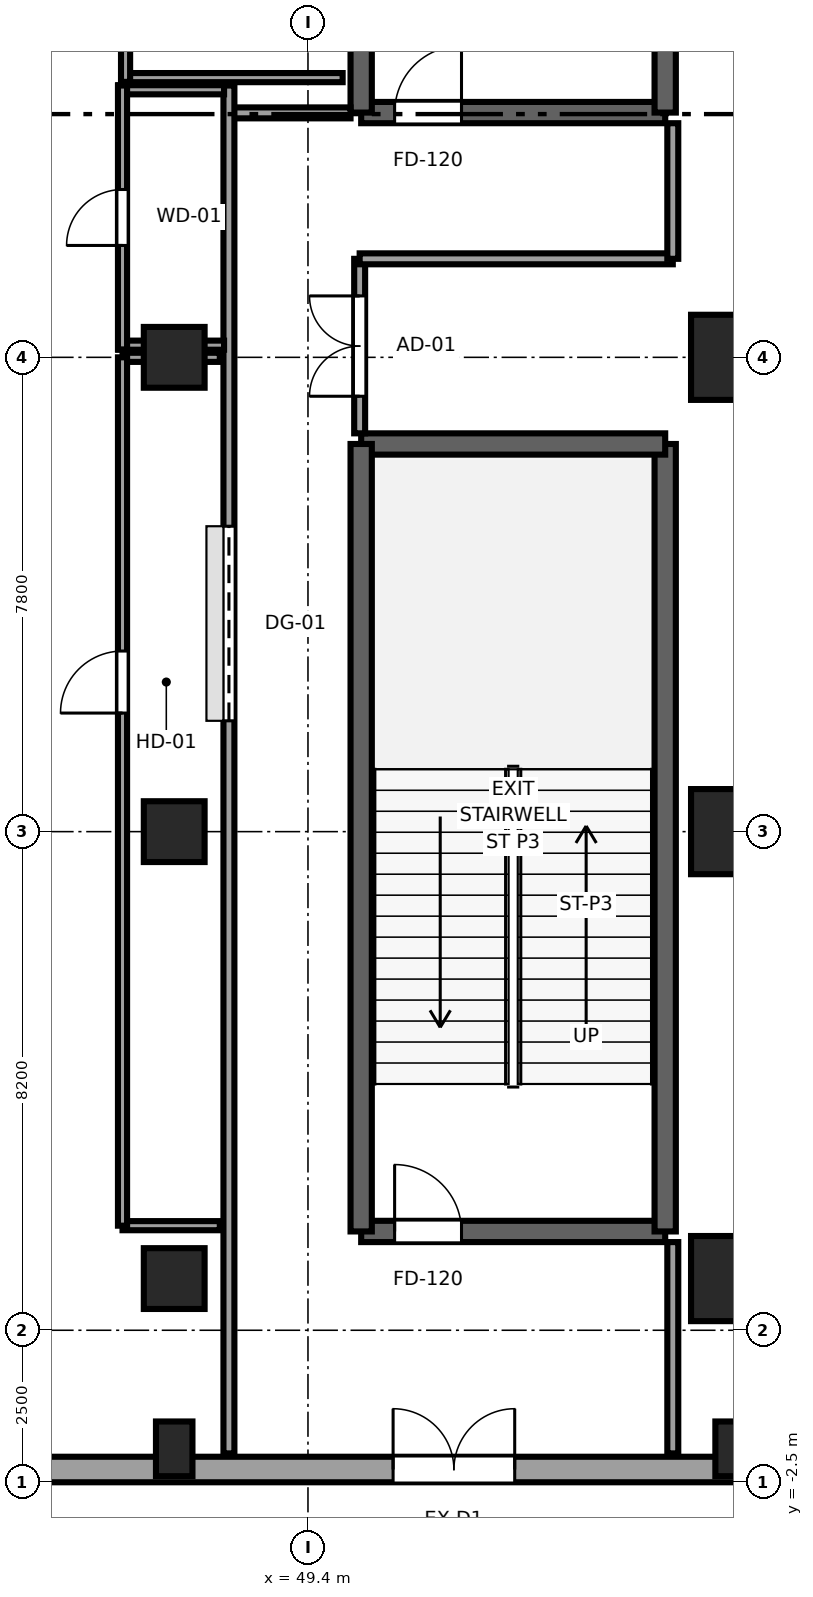
"""IFC4 building model, lengths in metres.
Left out: names, types, materials, properties, quantities, classifications, styles, units other than length and angle.
Written with IfcOpenShell. Run it as: python <this file> out.ifc"""

import sys

from ifc_helpers import new_model, si_unit, direction, frame, frame_2d, origin, origin_2d, place, context, subcontext, project, spatial, rectangle, extrude, source, transform, mapped, element, fill, save


model = new_model("IFC4")
c1 = context("Model", 3, precision=1e-05, world=origin(), true_north=direction((0.0, 1.0)))
c2 = subcontext(c1, "Body", "Model", "MODEL_VIEW")
j1 = project(units=[si_unit("LENGTHUNIT", "METRE"), si_unit("PLANEANGLEUNIT", "RADIAN")], contexts=[c1])
p1 = place(None, origin())
s1 = spatial("IfcSite", under=j1, at=p1, CompositionType="ELEMENT")
p2 = place(p1, origin())
s2 = spatial("IfcBuilding", under=s1, at=p2, CompositionType="ELEMENT")
p3 = place(p2, origin())
s3 = spatial("IfcBuildingStorey", under=s2, at=p3, CompositionType="ELEMENT", Elevation=0.0)
p4 = place(p3, frame((50.275, 1.625, 0.0), z_axis=(0.0, 0.0, 1.0), x_axis=(1.0, 0.0, 0.0)))
e1 = element("IfcWall", 1, at=p4, inside=s3, PredefinedType="SHEAR", context=c2, shape_type="SweptSolid", body=[
    extrude(rectangle(XDim=5.0, YDim=0.35, at=frame_2d((2.5, 0.0))), origin(), (0.0, 0.0, 1.0), 6.0),
])
p5 = place(p4, frame((1.65, 0.0, 0.0), z_axis=(0.0, 0.0, 1.0), x_axis=(-1.0, 0.0, 0.0)))
e2 = element("IfcOpeningElement", 2, at=p5, cuts=e1, PredefinedType="OPENING", context=c2, shape_type="SweptSolid", body=[
    extrude(rectangle(XDim=1.1, YDim=2.12, at=frame_2d((0.55, 1.06))), frame((0.0, 0.185, 0.0), z_axis=(0.0, -1.0, 0.0), x_axis=(1.0, 0.0, 0.0)), (0.0, 0.0, 1.0), 0.37),
])
p6 = place(p3, frame((55.275, 1.625, 0.0), z_axis=(0.0, 0.0, 1.0), x_axis=(0.0, 1.0, 0.0)))
e3 = element("IfcWall", 3, at=p6, inside=s3, PredefinedType="SHEAR", context=c2, shape_type="SweptSolid", body=[
    extrude(rectangle(XDim=12.95, YDim=0.35, at=frame_2d((6.475, 0.0))), origin(), (0.0, 0.0, 1.0), 6.0),
])
p7 = place(p3, frame((55.275, 14.575, 0.0), z_axis=(0.0, 0.0, 1.0), x_axis=(-1.0, 0.0, 0.0)))
e4 = element("IfcWall", 4, at=p7, inside=s3, PredefinedType="SHEAR", context=c2, shape_type="SweptSolid", body=[
    extrude(rectangle(XDim=5.0, YDim=0.35, at=frame_2d((2.5, 0.0))), origin(), (0.0, 0.0, 1.0), 6.0),
])
p8 = place(p3, frame((50.275, 14.575, 0.0), z_axis=(0.0, 0.0, 1.0), x_axis=(0.0, -1.0, 0.0)))
e5 = element("IfcWall", 5, at=p8, inside=s3, PredefinedType="SHEAR", context=c2, shape_type="SweptSolid", body=[
    extrude(rectangle(XDim=12.95, YDim=0.35, at=frame_2d((6.475, 0.0))), origin(), (0.0, 0.0, 1.0), 6.0),
])
p9 = place(p3, frame((50.275, 20.025, 0.0), z_axis=(0.0, 0.0, 1.0), x_axis=(1.0, 0.0, 0.0)))
e6 = element("IfcWall", 6, at=p9, inside=s3, PredefinedType="SHEAR", context=c2, shape_type="SweptSolid", body=[
    extrude(rectangle(XDim=5.0, YDim=0.35, at=frame_2d((2.5, 0.0))), origin(), (0.0, 0.0, 1.0), 6.0),
])
p10 = place(p9, frame((1.65, 0.0, 0.0), z_axis=(0.0, 0.0, 1.0), x_axis=(-1.0, 0.0, 0.0)))
e7 = element("IfcOpeningElement", 7, at=p10, cuts=e6, PredefinedType="OPENING", context=c2, shape_type="SweptSolid", body=[
    extrude(rectangle(XDim=1.1, YDim=2.12, at=frame_2d((0.55, 1.06))), frame((0.0, 0.185, 0.0), z_axis=(0.0, -1.0, 0.0), x_axis=(1.0, 0.0, 0.0)), (0.0, 0.0, 1.0), 0.37),
])
for number, where, z_axis, x_axis in (
    (8, (55.275, 20.025, 0.0), (0.0, 0.0, 1.0), (0.0, 1.0, 0.0)),
    (9, (50.275, 32.975, 0.0), (0.0, 0.0, 1.0), (0.0, -1.0, 0.0)),
):
    element("IfcWall", number, at=place(p3, frame(where, z_axis=z_axis, x_axis=x_axis)), inside=s3, PredefinedType="SHEAR", context=c2, shape_type="SweptSolid", body=[
        extrude(rectangle(XDim=12.95, YDim=0.35, at=frame_2d((6.475, 0.0))), origin(), (0.0, 0.0, 1.0), 6.0),
    ])
m1 = source(origin(), c2, "Body", "SweptSolid", [
    extrude(rectangle(XDim=1.0, YDim=1.0, at=origin_2d()), origin(), (0.0, 0.0, 1.0), 6.0),
])
p11 = place(p3, frame((47.2, 0.85, 0.0), z_axis=(0.0, 0.0, 1.0), x_axis=(1.0, 0.0, 0.0)))
e10 = element("IfcColumn", 10, at=p11, inside=s3, PredefinedType="COLUMN", context=c2, shape_type="MappedRepresentation", body=[
    mapped(m1, transform((0.0, 0.0, 0.0), x_axis=(1.0, 0.0, 0.0), y_axis=(0.0, 1.0, 0.0), z_axis=(0.0, 0.0, 1.0), scale=1.0)),
])
m2 = source(origin(), c2, "Body", "SweptSolid", [
    extrude(rectangle(XDim=1.4, YDim=1.4, at=origin_2d()), origin(), (0.0, 0.0, 1.0), 6.0),
])
p12 = place(p3, frame((56.4, 0.85, 0.0), z_axis=(0.0, 0.0, 1.0), x_axis=(1.0, 0.0, 0.0)))
e11 = element("IfcColumn", 11, at=p12, inside=s3, PredefinedType="COLUMN", context=c2, shape_type="MappedRepresentation", body=[
    mapped(m2, transform((0.0, 0.0, 0.0), x_axis=(1.0, 0.0, 0.0), y_axis=(0.0, 1.0, 0.0), z_axis=(0.0, 0.0, 1.0), scale=1.0)),
])
p13 = place(p3, frame((47.2, 8.2, 0.0), z_axis=(0.0, 0.0, 1.0), x_axis=(1.0, 0.0, 0.0)))
e12 = element("IfcColumn", 12, at=p13, inside=s3, PredefinedType="COLUMN", context=c2, shape_type="MappedRepresentation", body=[
    mapped(m1, transform((0.0, 0.0, 0.0), x_axis=(1.0, 0.0, 0.0), y_axis=(0.0, 1.0, 0.0), z_axis=(0.0, 0.0, 1.0), scale=1.0)),
])
p14 = place(p3, frame((56.4, 8.2, 0.0), z_axis=(0.0, 0.0, 1.0), x_axis=(1.0, 0.0, 0.0)))
e13 = element("IfcColumn", 13, at=p14, inside=s3, PredefinedType="COLUMN", context=c2, shape_type="MappedRepresentation", body=[
    mapped(m2, transform((0.0, 0.0, 0.0), x_axis=(1.0, 0.0, 0.0), y_axis=(0.0, 1.0, 0.0), z_axis=(0.0, 0.0, 1.0), scale=1.0)),
])
p15 = place(p3, frame((47.2, 16.0, 0.0), z_axis=(0.0, 0.0, 1.0), x_axis=(1.0, 0.0, 0.0)))
e14 = element("IfcColumn", 14, at=p15, inside=s3, PredefinedType="COLUMN", context=c2, shape_type="MappedRepresentation", body=[
    mapped(m1, transform((0.0, 0.0, 0.0), x_axis=(1.0, 0.0, 0.0), y_axis=(0.0, 1.0, 0.0), z_axis=(0.0, 0.0, 1.0), scale=1.0)),
])
p16 = place(p3, frame((56.4, 16.0, 0.0), z_axis=(0.0, 0.0, 1.0), x_axis=(1.0, 0.0, 0.0)))
e15 = element("IfcColumn", 15, at=p16, inside=s3, PredefinedType="COLUMN", context=c2, shape_type="MappedRepresentation", body=[
    mapped(m2, transform((0.0, 0.0, 0.0), x_axis=(1.0, 0.0, 0.0), y_axis=(0.0, 1.0, 0.0), z_axis=(0.0, 0.0, 1.0), scale=1.0)),
])
m3 = source(origin(), c2, "Body", "SweptSolid", [
    extrude(rectangle(XDim=0.6, YDim=0.9, at=origin_2d()), origin(), (0.0, 0.0, 1.0), 6.0),
])
for number, where, z_axis, x_axis in (
    (16, (47.2, -1.95, 0.0), (0.0, 0.0, 1.0), (1.0, 0.0, 0.0)),
    (17, (56.4, -1.95, 0.0), (0.0, 0.0, 1.0), (1.0, 0.0, 0.0)),
):
    element("IfcColumn", number, at=place(p3, frame(where, z_axis=z_axis, x_axis=x_axis)), inside=s3, PredefinedType="PILASTER", context=c2, shape_type="MappedRepresentation", body=[
        mapped(m3, transform((0.0, 0.0, 0.0), x_axis=(1.0, 0.0, 0.0), y_axis=(0.0, 1.0, 0.0), z_axis=(0.0, 0.0, 1.0), scale=1.0)),
    ])
p17 = place(p3, frame((37.59, -2.29, 0.0), z_axis=(0.0, 0.0, 1.0), x_axis=(1.0, 0.0, 0.0)))
e18 = element("IfcWall", 18, at=p17, inside=s3, PredefinedType="SOLIDWALL", context=c2, shape_type="SweptSolid", body=[
    extrude(rectangle(XDim=27.6, YDim=0.42, at=frame_2d((13.8, 0.0))), origin(), (0.0, 0.0, 1.0), 5.74),
])
p18 = place(p17, frame((6.11, 0.0, 0.0), z_axis=(0.0, 0.0, 1.0), x_axis=(-1.0, 0.0, 0.0)))
e19 = element("IfcOpeningElement", 19, at=p18, cuts=e18, PredefinedType="OPENING", context=c2, shape_type="SweptSolid", body=[
    extrude(rectangle(XDim=2.0, YDim=2.25, at=frame_2d((1.0, 1.125))), frame((0.0, 0.22, 0.0), z_axis=(0.0, -1.0, 0.0), x_axis=(1.0, 0.0, 0.0)), (0.0, 0.0, 1.0), 0.44),
])
p19 = place(p17, frame((15.21, 0.0, 0.0), z_axis=(0.0, 0.0, 1.0), x_axis=(-1.0, 0.0, 0.0)))
e20 = element("IfcOpeningElement", 20, at=p19, cuts=e18, PredefinedType="OPENING", context=c2, shape_type="SweptSolid", body=[
    extrude(rectangle(XDim=2.0, YDim=2.25, at=frame_2d((1.0, 1.125))), frame((0.0, 0.22, 0.0), z_axis=(0.0, -1.0, 0.0), x_axis=(1.0, 0.0, 0.0)), (0.0, 0.0, 1.0), 0.44),
])
p20 = place(p17, frame((24.01, 0.0, 0.0), z_axis=(0.0, 0.0, 1.0), x_axis=(-1.0, 0.0, 0.0)))
e21 = element("IfcOpeningElement", 21, at=p20, cuts=e18, PredefinedType="OPENING", context=c2, shape_type="SweptSolid", body=[
    extrude(rectangle(XDim=2.0, YDim=2.25, at=frame_2d((1.0, 1.125))), frame((0.0, 0.22, 0.0), z_axis=(0.0, -1.0, 0.0), x_axis=(1.0, 0.0, 0.0)), (0.0, 0.0, 1.0), 0.44),
])
p21 = place(p3, frame((55.4, -2.025, 0.0), z_axis=(0.0, 0.0, 1.0), x_axis=(0.0, 1.0, 0.0)))
e22 = element("IfcWall", 22, at=p21, inside=s3, PredefinedType="PARTITIONING", context=c2, shape_type="SweptSolid", body=[
    extrude(rectangle(XDim=3.475, YDim=0.18, at=frame_2d((1.737, 0.0))), origin(), (0.0, 0.0, 1.0), 5.74),
])
p22 = place(p3, frame((50.25, 14.75, 0.0), z_axis=(0.0, 0.0, 1.0), x_axis=(0.0, 1.0, 0.0)))
e23 = element("IfcWall", 23, at=p22, inside=s3, PredefinedType="PARTITIONING", context=c2, shape_type="SweptSolid", body=[
    extrude(rectangle(XDim=2.87, YDim=0.18, at=frame_2d((1.435, 0.0))), origin(), (0.0, 0.0, 1.0), 5.74),
])
p23 = place(p22, frame((0.61, 0.0, 0.0)))
e24 = element("IfcOpeningElement", 24, at=p23, cuts=e23, PredefinedType="OPENING", context=c2, shape_type="SweptSolid", body=[
    extrude(rectangle(XDim=1.65, YDim=2.15, at=frame_2d((0.825, 1.075))), frame((0.0, 0.1, 0.0), z_axis=(0.0, -1.0, 0.0), x_axis=(1.0, 0.0, 0.0)), (0.0, 0.0, 1.0), 0.2),
])
p24 = place(p3, frame((50.25, 17.62, 0.0), z_axis=(0.0, 0.0, 1.0), x_axis=(1.0, 0.0, 0.0)))
e25 = element("IfcWall", 25, at=p24, inside=s3, PredefinedType="PARTITIONING", context=c2, shape_type="SweptSolid", body=[
    extrude(rectangle(XDim=5.15, YDim=0.18, at=frame_2d((2.575, 0.0))), origin(), (0.0, 0.0, 1.0), 5.74),
])
p25 = place(p3, frame((55.4, 17.62, 0.0), z_axis=(0.0, 0.0, 1.0), x_axis=(0.0, 1.0, 0.0)))
e26 = element("IfcWall", 26, at=p25, inside=s3, PredefinedType="PARTITIONING", context=c2, shape_type="SweptSolid", body=[
    extrude(rectangle(XDim=2.23, YDim=0.18, at=frame_2d((1.115, 0.0))), origin(), (0.0, 0.0, 1.0), 5.74),
])
p26 = place(p3, frame((48.1, 20.02, 0.0), z_axis=(0.0, 0.0, 1.0), x_axis=(1.0, 0.0, 0.0)))
e27 = element("IfcWall", 27, at=p26, inside=s3, PredefinedType="PARTITIONING", context=c2, shape_type="SweptSolid", body=[
    extrude(rectangle(XDim=2.0, YDim=0.18, at=frame_2d((1.0, 0.0))), origin(), (0.0, 0.0, 1.0), 5.74),
])
p27 = place(p3, frame((48.1, -2.025, 0.0), z_axis=(0.0, 0.0, 1.0), x_axis=(0.0, 1.0, 0.0)))
e28 = element("IfcWall", 28, at=p27, inside=s3, PredefinedType="PARTITIONING", context=c2, shape_type="SweptSolid", body=[
    extrude(rectangle(XDim=22.495, YDim=0.18, at=frame_2d((11.248, 0.0))), origin(), (0.0, 0.0, 1.0), 5.74),
])
p28 = place(p27, frame((12.048, 0.0, 0.0)))
e29 = element("IfcOpeningElement", 29, at=p28, cuts=e28, PredefinedType="OPENING", context=c2, shape_type="SweptSolid", body=[
    extrude(rectangle(XDim=3.2, YDim=2.8, at=frame_2d((1.6, 1.4))), frame((0.0, 0.1, 0.0), z_axis=(0.0, -1.0, 0.0), x_axis=(1.0, 0.0, 0.0)), (0.0, 0.0, 1.0), 0.2),
])
p29 = place(p3, frame((46.28, 16.2, 0.0), z_axis=(0.0, 0.0, 1.0), x_axis=(1.0, 0.0, 0.0)))
e30 = element("IfcWall", 30, at=p29, inside=s3, PredefinedType="PARTITIONING", context=c2, shape_type="SweptSolid", body=[
    extrude(rectangle(XDim=1.74, YDim=0.15, at=frame_2d((0.87, 0.0))), origin(), (0.0, 0.0, 1.0), 4.914),
])
p30 = place(p3, frame((46.28, 20.4, 0.0), z_axis=(0.0, 0.0, 1.0), x_axis=(1.0, 0.0, 0.0)))
e31 = element("IfcWall", 31, at=p30, inside=s3, PredefinedType="PARTITIONING", context=c2, shape_type="SweptSolid", body=[
    extrude(rectangle(XDim=1.74, YDim=0.15, at=frame_2d((0.87, 0.0))), origin(), (0.0, 0.0, 1.0), 5.74),
])
p31 = place(p3, frame((46.35, 16.13, 0.0), z_axis=(0.0, 0.0, 1.0), x_axis=(0.0, 1.0, 0.0)))
e32 = element("IfcWall", 32, at=p31, inside=s3, PredefinedType="PARTITIONING", context=c2, shape_type="SweptSolid", body=[
    extrude(rectangle(XDim=4.34, YDim=0.15, at=frame_2d((2.17, 0.0))), origin(), (0.0, 0.0, 1.0), 5.74),
])
p32 = place(p31, frame((1.71, 0.0, 0.0)))
e33 = element("IfcOpeningElement", 33, at=p32, cuts=e32, PredefinedType="OPENING", context=c2, shape_type="SweptSolid", body=[
    extrude(rectangle(XDim=0.92, YDim=2.01, at=frame_2d((0.46, 1.005))), frame((0.0, 0.085, 0.0), z_axis=(0.0, -1.0, 0.0), x_axis=(1.0, 0.0, 0.0)), (0.0, 0.0, 1.0), 0.17),
])
p33 = place(p3, frame((46.33, 20.6, 0.0), z_axis=(0.0, 0.0, 1.0), x_axis=(1.0, 0.0, 0.0)))
e34 = element("IfcWall", 34, at=p33, inside=s3, PredefinedType="PARTITIONING", context=c2, shape_type="SweptSolid", body=[
    extrude(rectangle(XDim=3.64, YDim=0.15, at=frame_2d((1.82, 0.0))), origin(), (0.0, 0.0, 1.0), 5.74),
])
p34 = place(p3, frame((46.4, 20.53, 0.0), z_axis=(0.0, 0.0, 1.0), x_axis=(0.0, 1.0, 0.0)))
e35 = element("IfcWall", 35, at=p34, inside=s3, PredefinedType="PARTITIONING", context=c2, shape_type="SweptSolid", body=[
    extrude(rectangle(XDim=4.14, YDim=0.15, at=frame_2d((2.07, 0.0))), origin(), (0.0, 0.0, 1.0), 5.74),
])
p35 = place(p34, frame((1.31, 0.0, 0.0)))
e36 = element("IfcOpeningElement", 36, at=p35, cuts=e35, PredefinedType="OPENING", context=c2, shape_type="SweptSolid", body=[
    extrude(rectangle(XDim=0.92, YDim=2.01, at=frame_2d((0.46, 1.005))), frame((0.0, 0.085, 0.0), z_axis=(0.0, -1.0, 0.0), x_axis=(1.0, 0.0, 0.0)), (0.0, 0.0, 1.0), 0.17),
])
p36 = place(p3, frame((46.35, 1.72, 0.0), z_axis=(0.0, 0.0, 1.0), x_axis=(1.0, 0.0, 0.0)))
e37 = element("IfcWall", 37, at=p36, inside=s3, PredefinedType="PARTITIONING", context=c2, shape_type="SweptSolid", body=[
    extrude(rectangle(XDim=1.6, YDim=0.15, at=frame_2d((0.8, 0.0))), origin(), (0.0, 0.0, 1.0), 5.74),
])
p37 = place(p3, frame((46.35, 16.0, 0.0), z_axis=(0.0, 0.0, 1.0), x_axis=(1.0, 0.0, 0.0)))
e38 = element("IfcWall", 38, at=p37, inside=s3, PredefinedType="PARTITIONING", context=c2, shape_type="SweptSolid", body=[
    extrude(rectangle(XDim=1.6, YDim=0.15, at=frame_2d((0.8, 0.0))), origin(), (0.0, 0.0, 1.0), 4.914),
])
p38 = place(p3, frame((46.35, 1.72, 0.0), z_axis=(0.0, 0.0, 1.0), x_axis=(0.0, 1.0, 0.0)))
e39 = element("IfcWall", 39, at=p38, inside=s3, PredefinedType="PARTITIONING", context=c2, shape_type="SweptSolid", body=[
    extrude(rectangle(XDim=14.28, YDim=0.15, at=frame_2d((7.14, 0.0))), origin(), (0.0, 0.0, 1.0), 5.74),
])
p39 = place(p38, frame((8.43, 0.0, 0.0)))
e40 = element("IfcOpeningElement", 40, at=p39, cuts=e39, PredefinedType="OPENING", context=c2, shape_type="SweptSolid", body=[
    extrude(rectangle(XDim=1.02, YDim=2.03, at=frame_2d((0.51, 1.015))), frame((0.0, 0.085, 0.0), z_axis=(0.0, -1.0, 0.0), x_axis=(1.0, 0.0, 0.0)), (0.0, 0.0, 1.0), 0.17),
])
m4 = source(origin(), c2, "Body", "SweptSolid", [
    extrude(rectangle(XDim=2.0, YDim=2.25, at=frame_2d((1.0, 1.125))), frame((0.0, 0.025, 0.0), z_axis=(0.0, -1.0, 0.0), x_axis=(1.0, 0.0, 0.0)), (0.0, 0.0, 1.0), 0.05),
])
p40 = place(p19, origin())
e41 = element("IfcDoor", 41, at=p40, inside=s3, OperationType="DOUBLE_DOOR_SINGLE_SWING", PredefinedType="DOOR", context=c2, shape_type="MappedRepresentation", body=[
    mapped(m4, transform((0.0, 0.0, 0.0), x_axis=(1.0, 0.0, 0.0), y_axis=(0.0, 1.0, 0.0), z_axis=(0.0, 0.0, 1.0), scale=1.0)),
])
fill(e20, e41)
m5 = source(origin(), c2, "Body", "SweptSolid", [
    extrude(rectangle(XDim=1.1, YDim=2.12, at=frame_2d((0.55, 1.06))), frame((0.0, 0.025, 0.0), z_axis=(0.0, -1.0, 0.0), x_axis=(1.0, 0.0, 0.0)), (0.0, 0.0, 1.0), 0.05),
])
p41 = place(p5, origin())
e42 = element("IfcDoor", 42, at=p41, inside=s3, OperationType="SINGLE_SWING_LEFT", PredefinedType="DOOR", context=c2, shape_type="MappedRepresentation", body=[
    mapped(m5, transform((0.0, 0.0, 0.0), x_axis=(1.0, 0.0, 0.0), y_axis=(0.0, 1.0, 0.0), z_axis=(0.0, 0.0, 1.0), scale=1.0)),
])
fill(e2, e42)
p42 = place(p10, origin())
e43 = element("IfcDoor", 43, at=p42, inside=s3, OperationType="SINGLE_SWING_RIGHT", PredefinedType="DOOR", context=c2, shape_type="MappedRepresentation", body=[
    mapped(m5, transform((0.0, 0.0, 0.0), x_axis=(1.0, 0.0, 0.0), y_axis=(0.0, 1.0, 0.0), z_axis=(0.0, 0.0, 1.0), scale=1.0)),
])
fill(e7, e43)
m6 = source(origin(), c2, "Body", "SweptSolid", [
    extrude(rectangle(XDim=1.65, YDim=2.15, at=frame_2d((0.825, 1.075))), frame((0.0, 0.025, 0.0), z_axis=(0.0, -1.0, 0.0), x_axis=(1.0, 0.0, 0.0)), (0.0, 0.0, 1.0), 0.05),
])
p43 = place(p23, origin())
e44 = element("IfcDoor", 44, at=p43, inside=s3, OperationType="DOUBLE_DOOR_SINGLE_SWING", PredefinedType="DOOR", context=c2, shape_type="MappedRepresentation", body=[
    mapped(m6, transform((0.0, 0.0, 0.0), x_axis=(1.0, 0.0, 0.0), y_axis=(0.0, 1.0, 0.0), z_axis=(0.0, 0.0, 1.0), scale=1.0)),
])
fill(e24, e44)
m7 = source(origin(), c2, "Body", "SweptSolid", [
    extrude(rectangle(XDim=0.92, YDim=2.01, at=frame_2d((0.46, 1.005))), frame((0.0, 0.025, 0.0), z_axis=(0.0, -1.0, 0.0), x_axis=(1.0, 0.0, 0.0)), (0.0, 0.0, 1.0), 0.05),
])
p44 = place(p32, origin())
e45 = element("IfcDoor", 45, at=p44, inside=s3, OperationType="SINGLE_SWING_LEFT", PredefinedType="DOOR", context=c2, shape_type="MappedRepresentation", body=[
    mapped(m7, transform((0.0, 0.0, 0.0), x_axis=(1.0, 0.0, 0.0), y_axis=(0.0, 1.0, 0.0), z_axis=(0.0, 0.0, 1.0), scale=1.0)),
])
fill(e33, e45)
m8 = source(origin(), c2, "Body", "SweptSolid", [
    extrude(rectangle(XDim=1.02, YDim=2.03, at=frame_2d((0.51, 1.015))), frame((0.0, 0.025, 0.0), z_axis=(0.0, -1.0, 0.0), x_axis=(1.0, 0.0, 0.0)), (0.0, 0.0, 1.0), 0.05),
])
p45 = place(p39, origin())
e46 = element("IfcDoor", 46, at=p45, inside=s3, OperationType="SINGLE_SWING_LEFT", PredefinedType="DOOR", context=c2, shape_type="MappedRepresentation", body=[
    mapped(m8, transform((0.0, 0.0, 0.0), x_axis=(1.0, 0.0, 0.0), y_axis=(0.0, 1.0, 0.0), z_axis=(0.0, 0.0, 1.0), scale=1.0)),
])
fill(e40, e46)
m9 = source(origin(), c2, "Body", "SweptSolid", [
    extrude(rectangle(XDim=3.2, YDim=2.8, at=frame_2d((1.6, 1.4))), frame((0.0, 0.025, 0.0), z_axis=(0.0, -1.0, 0.0), x_axis=(1.0, 0.0, 0.0)), (0.0, 0.0, 1.0), 0.05),
])
p46 = place(p28, origin())
e47 = element("IfcDoor", 47, at=p46, inside=s3, OperationType="ROLLINGUP", PredefinedType="GATE", context=c2, shape_type="MappedRepresentation", body=[
    mapped(m9, transform((0.0, 0.0, 0.0), x_axis=(1.0, 0.0, 0.0), y_axis=(0.0, 1.0, 0.0), z_axis=(0.0, 0.0, 1.0), scale=1.0)),
])
fill(e29, e47)
save(model, sys.argv[1])
